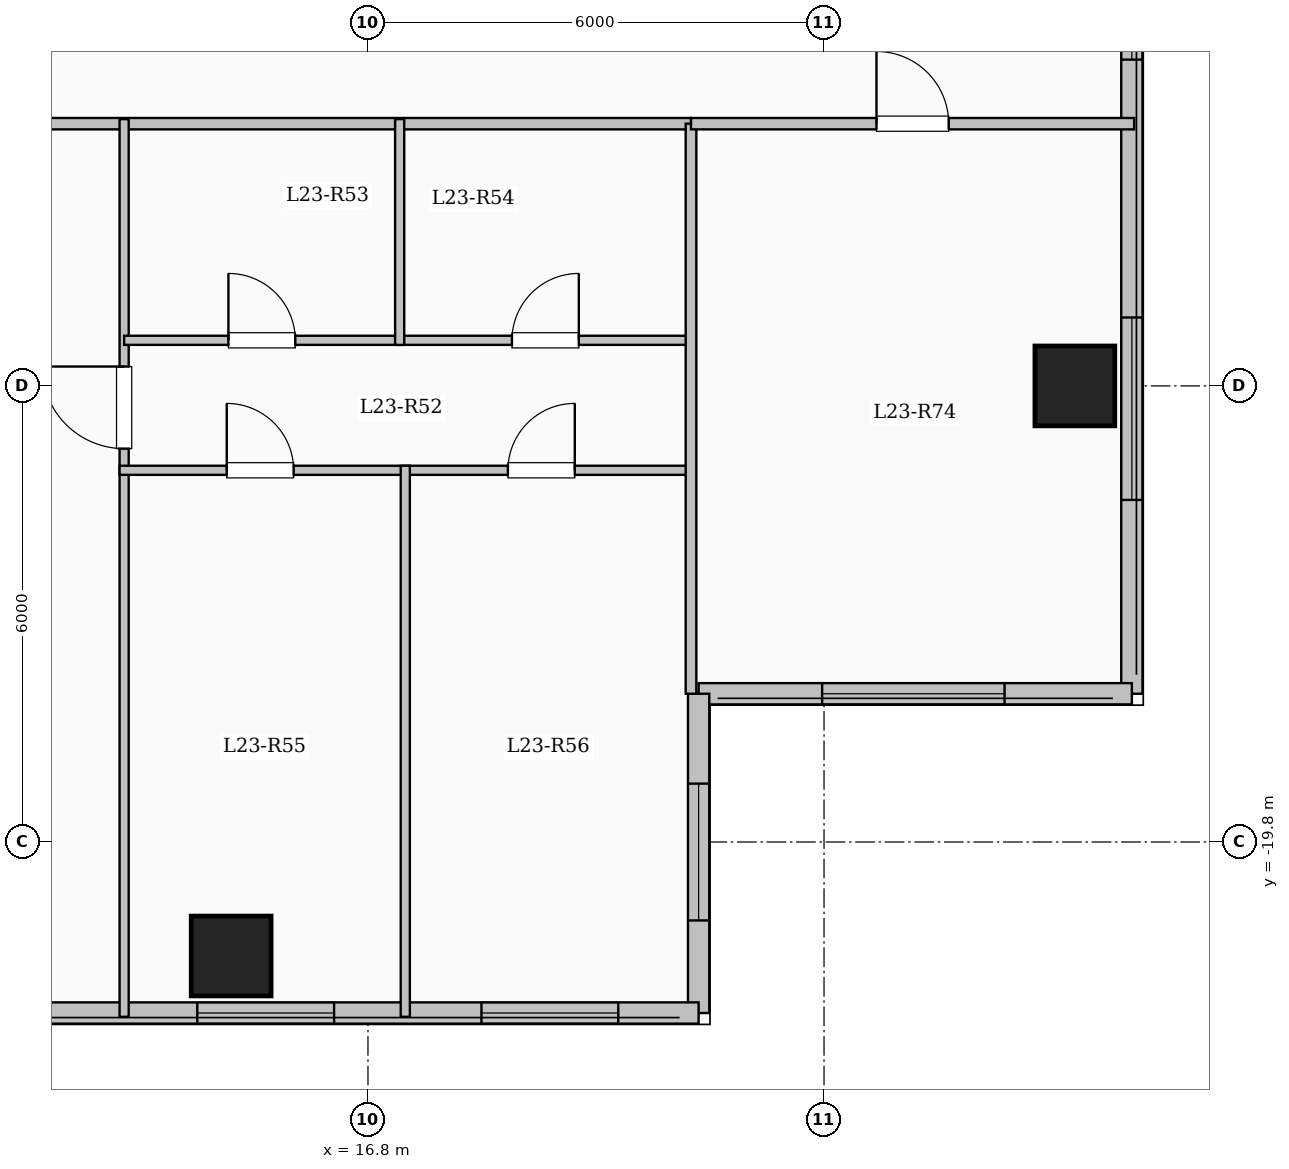
"""IFC4 building model, lengths in metres.
Left out: names, types, materials, properties, quantities, classifications, styles, units other than length and angle.
Written with IfcOpenShell. Run it as: python <this file> out.ifc"""

import sys

from ifc_helpers import new_model, si_unit, direction, frame, frame_2d, origin, origin_2d, place, context, subcontext, project, spatial, rectangle, extrude, element, fill, save


model = new_model("IFC4")
c1 = context("Model", 3, precision=1e-05, world=origin(), true_north=direction((0.0, 1.0)))
c2 = subcontext(c1, "Body", "Model", "MODEL_VIEW")
j1 = project(units=[si_unit("LENGTHUNIT", "METRE"), si_unit("PLANEANGLEUNIT", "RADIAN")], contexts=[c1])
p1 = place(None, origin())
s1 = spatial("IfcSite", under=j1, at=p1, CompositionType="ELEMENT")
p2 = place(p1, origin())
s2 = spatial("IfcBuilding", under=s1, at=p2, CompositionType="ELEMENT")
p3 = place(p2, frame((0.0, 0.0, 88.35)))
s3 = spatial("IfcBuildingStorey", under=s2, at=p3, CompositionType="ELEMENT", Elevation=88.35)
for number, where, z_axis, x_axis in (
    (1, (15.0, -21.3, 0.0), (0.0, 0.0, 1.0), (1.0, 0.0, 0.0)),
    (2, (26.1, -13.8, 0.0), (0.0, 0.0, 1.0), (1.0, 0.0, 0.0)),
):
    element("IfcColumn", number, at=place(p3, frame(where, z_axis=z_axis, x_axis=x_axis)), inside=s3, PredefinedType="COLUMN", context=c2, shape_type="SweptSolid", body=[
        extrude(rectangle(XDim=1.05, YDim=1.05, at=origin_2d()), origin(), (0.0, 0.0, 1.0), 3.35),
    ])
p4 = place(p3, frame((26.85, 17.85, 0.0), z_axis=(0.0, 0.0, 1.0), x_axis=(0.0, -1.0, 0.0)))
e3 = element("IfcWall", 3, at=p4, inside=s3, PredefinedType="SOLIDWALL", context=c2, shape_type="SweptSolid", body=[
    extrude(rectangle(XDim=35.7, YDim=0.28, at=frame_2d((17.85, 0.0))), origin(), (0.0, 0.0, 1.0), 3.1),
])
p5 = place(p4, frame((1.675, 0.0, 0.9)))
e4 = element("IfcOpeningElement", 4, at=p5, cuts=e3, PredefinedType="OPENING", context=c2, shape_type="SweptSolid", body=[
    extrude(rectangle(XDim=2.0, YDim=1.7, at=frame_2d((1.0, 0.85))), frame((0.0, 0.15, 0.0), z_axis=(0.0, -1.0, 0.0), x_axis=(1.0, 0.0, 0.0)), (0.0, 0.0, 1.0), 0.3),
])
p6 = place(p4, frame((5.725, 0.0, 0.95)))
e5 = element("IfcOpeningElement", 5, at=p6, cuts=e3, PredefinedType="OPENING", context=c2, shape_type="SweptSolid", body=[
    extrude(rectangle(XDim=1.0, YDim=1.5, at=frame_2d((0.5, 0.75))), frame((0.0, 0.15, 0.0), z_axis=(0.0, -1.0, 0.0), x_axis=(1.0, 0.0, 0.0)), (0.0, 0.0, 1.0), 0.3),
])
p7 = place(p4, frame((15.1, 0.0, 0.9)))
e6 = element("IfcOpeningElement", 6, at=p7, cuts=e3, PredefinedType="OPENING", context=c2, shape_type="SweptSolid", body=[
    extrude(rectangle(XDim=2.0, YDim=1.7, at=frame_2d((1.0, 0.85))), frame((0.0, 0.15, 0.0), z_axis=(0.0, -1.0, 0.0), x_axis=(1.0, 0.0, 0.0)), (0.0, 0.0, 1.0), 0.3),
])
p8 = place(p4, frame((25.857, 0.0, 0.9)))
e7 = element("IfcOpeningElement", 7, at=p8, cuts=e3, PredefinedType="OPENING", context=c2, shape_type="SweptSolid", body=[
    extrude(rectangle(XDim=1.5, YDim=1.65, at=frame_2d((0.75, 0.825))), frame((0.0, 0.15, 0.0), z_axis=(0.0, -1.0, 0.0), x_axis=(1.0, 0.0, 0.0)), (0.0, 0.0, 1.0), 0.3),
])
p9 = place(p4, frame((30.75, 0.0, 0.9)))
e8 = element("IfcOpeningElement", 8, at=p9, cuts=e3, PredefinedType="OPENING", context=c2, shape_type="SweptSolid", body=[
    extrude(rectangle(XDim=2.4, YDim=1.8, at=frame_2d((1.2, 0.9))), frame((0.0, 0.15, 0.0), z_axis=(0.0, -1.0, 0.0), x_axis=(1.0, 0.0, 0.0)), (0.0, 0.0, 1.0), 0.3),
])
p10 = place(p3, frame((26.85, -17.85, 0.0), z_axis=(0.0, 0.0, 1.0), x_axis=(-1.0, 0.0, 0.0)))
e9 = element("IfcWall", 9, at=p10, inside=s3, PredefinedType="SOLIDWALL", context=c2, shape_type="SweptSolid", body=[
    extrude(rectangle(XDim=5.7, YDim=0.28, at=frame_2d((2.85, 0.0))), origin(), (0.0, 0.0, 1.0), 3.1),
])
p11 = place(p10, frame((1.675, 0.0, 0.9)))
e10 = element("IfcOpeningElement", 10, at=p11, cuts=e9, PredefinedType="OPENING", context=c2, shape_type="SweptSolid", body=[
    extrude(rectangle(XDim=2.4, YDim=1.8, at=frame_2d((1.2, 0.9))), frame((0.0, 0.15, 0.0), z_axis=(0.0, -1.0, 0.0), x_axis=(1.0, 0.0, 0.0)), (0.0, 0.0, 1.0), 0.3),
])
p12 = place(p3, frame((21.15, -17.85, 0.0), z_axis=(0.0, 0.0, 1.0), x_axis=(0.0, -1.0, 0.0)))
e11 = element("IfcWall", 11, at=p12, inside=s3, PredefinedType="SOLIDWALL", context=c2, shape_type="SweptSolid", body=[
    extrude(rectangle(XDim=4.2, YDim=0.28, at=frame_2d((2.1, 0.0))), origin(), (0.0, 0.0, 1.0), 3.1),
])
p13 = place(p12, frame((1.182, 0.0, 0.9)))
e12 = element("IfcOpeningElement", 12, at=p13, cuts=e11, PredefinedType="OPENING", context=c2, shape_type="SweptSolid", body=[
    extrude(rectangle(XDim=1.8, YDim=1.65, at=frame_2d((0.9, 0.825))), frame((0.0, 0.15, 0.0), z_axis=(0.0, -1.0, 0.0), x_axis=(1.0, 0.0, 0.0)), (0.0, 0.0, 1.0), 0.3),
])
p14 = place(p3, frame((21.15, -22.05, 0.0), z_axis=(0.0, 0.0, 1.0), x_axis=(-1.0, 0.0, 0.0)))
e13 = element("IfcWall", 13, at=p14, inside=s3, PredefinedType="SOLIDWALL", context=c2, shape_type="SweptSolid", body=[
    extrude(rectangle(XDim=13.8, YDim=0.28, at=frame_2d((6.9, 0.0))), origin(), (0.0, 0.0, 1.0), 3.1),
])
p15 = place(p14, frame((1.057, 0.0, 0.9)))
e14 = element("IfcOpeningElement", 14, at=p15, cuts=e13, PredefinedType="OPENING", context=c2, shape_type="SweptSolid", body=[
    extrude(rectangle(XDim=1.8, YDim=1.65, at=frame_2d((0.9, 0.825))), frame((0.0, 0.15, 0.0), z_axis=(0.0, -1.0, 0.0), x_axis=(1.0, 0.0, 0.0)), (0.0, 0.0, 1.0), 0.3),
])
p16 = place(p14, frame((4.796, 0.0, 0.9)))
e15 = element("IfcOpeningElement", 15, at=p16, cuts=e13, PredefinedType="OPENING", context=c2, shape_type="SweptSolid", body=[
    extrude(rectangle(XDim=1.8, YDim=1.65, at=frame_2d((0.9, 0.825))), frame((0.0, 0.15, 0.0), z_axis=(0.0, -1.0, 0.0), x_axis=(1.0, 0.0, 0.0)), (0.0, 0.0, 1.0), 0.3),
])
p17 = place(p14, frame((8.862, 0.0, 0.9)))
e16 = element("IfcOpeningElement", 16, at=p17, cuts=e13, PredefinedType="OPENING", context=c2, shape_type="SweptSolid", body=[
    extrude(rectangle(XDim=2.4, YDim=1.8, at=frame_2d((1.2, 0.9))), frame((0.0, 0.15, 0.0), z_axis=(0.0, -1.0, 0.0), x_axis=(1.0, 0.0, 0.0)), (0.0, 0.0, 1.0), 0.3),
])
p18 = place(p14, frame((12.803, 0.0, 0.95)))
e17 = element("IfcOpeningElement", 17, at=p18, cuts=e13, PredefinedType="OPENING", context=c2, shape_type="SweptSolid", body=[
    extrude(rectangle(XDim=0.85, YDim=1.5, at=frame_2d((0.425, 0.75))), frame((0.0, 0.15, 0.0), z_axis=(0.0, -1.0, 0.0), x_axis=(1.0, 0.0, 0.0)), (0.0, 0.0, 1.0), 0.3),
])
p19 = place(p3, frame((8.55, -10.35, 0.0), z_axis=(0.0, 0.0, 1.0), x_axis=(1.0, 0.0, 0.0)))
e18 = element("IfcWall", 18, at=p19, inside=s3, PredefinedType="PARTITIONING", context=c2, shape_type="SweptSolid", body=[
    extrude(rectangle(XDim=12.5, YDim=0.15, at=frame_2d((6.25, 0.0))), origin(), (0.0, 0.0, 1.0), 3.1),
])
p20 = place(p19, frame((0.75, 0.0, 0.0)))
e19 = element("IfcOpeningElement", 19, at=p20, cuts=e18, PredefinedType="OPENING", context=c2, shape_type="SweptSolid", body=[
    extrude(rectangle(XDim=0.96, YDim=2.15, at=frame_2d((0.48, 1.075))), frame((0.0, 0.085, 0.0), z_axis=(0.0, -1.0, 0.0), x_axis=(1.0, 0.0, 0.0)), (0.0, 0.0, 1.0), 0.17),
])
p21 = place(p3, frame((13.592, -22.1, 0.0), z_axis=(0.0, 0.0, 1.0), x_axis=(0.0, 1.0, 0.0)))
e20 = element("IfcWall", 20, at=p21, inside=s3, PredefinedType="PARTITIONING", context=c2, shape_type="SweptSolid", body=[
    extrude(rectangle(XDim=11.81, YDim=0.12, at=frame_2d((5.905, 0.0))), origin(), (0.0, 0.0, 1.0), 3.1),
])
p22 = place(p21, frame((7.475, 0.0, 0.0)))
e21 = element("IfcOpeningElement", 21, at=p22, cuts=e20, PredefinedType="OPENING", context=c2, shape_type="SweptSolid", body=[
    extrude(rectangle(XDim=1.08, YDim=2.15, at=frame_2d((0.54, 1.075))), frame((0.0, 0.07, 0.0), z_axis=(0.0, -1.0, 0.0), x_axis=(1.0, 0.0, 0.0)), (0.0, 0.0, 1.0), 0.14),
])
p23 = place(p3, frame((13.592, -13.2, 0.0), z_axis=(0.0, 0.0, 1.0), x_axis=(1.0, 0.0, 0.0)))
e22 = element("IfcWall", 22, at=p23, inside=s3, PredefinedType="PARTITIONING", context=c2, shape_type="SweptSolid", body=[
    extrude(rectangle(XDim=3.625, YDim=0.12, at=frame_2d((1.812, 0.0))), origin(), (0.0, 0.0, 1.0), 3.1),
])
p24 = place(p23, frame((1.372, 0.0, 0.0)))
e23 = element("IfcOpeningElement", 23, at=p24, cuts=e22, PredefinedType="OPENING", context=c2, shape_type="SweptSolid", body=[
    extrude(rectangle(XDim=0.88, YDim=2.1, at=frame_2d((0.44, 1.05))), frame((0.0, 0.07, 0.0), z_axis=(0.0, -1.0, 0.0), x_axis=(1.0, 0.0, 0.0)), (0.0, 0.0, 1.0), 0.14),
])
p25 = place(p3, frame((17.217, -13.2, 0.0), z_axis=(0.0, 0.0, 1.0), x_axis=(1.0, 0.0, 0.0)))
e24 = element("IfcWall", 24, at=p25, inside=s3, PredefinedType="PARTITIONING", context=c2, shape_type="SweptSolid", body=[
    extrude(rectangle(XDim=3.833, YDim=0.12, at=frame_2d((1.917, 0.0))), origin(), (0.0, 0.0, 1.0), 3.1),
])
p26 = place(p25, frame((1.477, 0.0, 0.0)))
e25 = element("IfcOpeningElement", 25, at=p26, cuts=e24, PredefinedType="OPENING", context=c2, shape_type="SweptSolid", body=[
    extrude(rectangle(XDim=0.88, YDim=2.1, at=frame_2d((0.44, 1.05))), frame((0.0, 0.07, 0.0), z_axis=(0.0, -1.0, 0.0), x_axis=(1.0, 0.0, 0.0)), (0.0, 0.0, 1.0), 0.14),
])
p27 = place(p3, frame((13.532, -14.91, 0.0), z_axis=(0.0, 0.0, 1.0), x_axis=(1.0, 0.0, 0.0)))
e26 = element("IfcWall", 26, at=p27, inside=s3, PredefinedType="PARTITIONING", context=c2, shape_type="SweptSolid", body=[
    extrude(rectangle(XDim=7.578, YDim=0.12, at=frame_2d((3.789, 0.0))), origin(), (0.0, 0.0, 1.0), 3.1),
])
p28 = place(p27, frame((1.41, 0.0, 0.0)))
e27 = element("IfcOpeningElement", 27, at=p28, cuts=e26, PredefinedType="OPENING", context=c2, shape_type="SweptSolid", body=[
    extrude(rectangle(XDim=0.88, YDim=2.1, at=frame_2d((0.44, 1.05))), frame((0.0, 0.07, 0.0), z_axis=(0.0, -1.0, 0.0), x_axis=(1.0, 0.0, 0.0)), (0.0, 0.0, 1.0), 0.14),
])
p29 = place(p27, frame((5.109, 0.0, 0.0)))
e28 = element("IfcOpeningElement", 28, at=p29, cuts=e26, PredefinedType="OPENING", context=c2, shape_type="SweptSolid", body=[
    extrude(rectangle(XDim=0.88, YDim=2.1, at=frame_2d((0.44, 1.05))), frame((0.0, 0.07, 0.0), z_axis=(0.0, -1.0, 0.0), x_axis=(1.0, 0.0, 0.0)), (0.0, 0.0, 1.0), 0.14),
])
p30 = place(p3, frame((17.217, -13.26, 0.0), z_axis=(0.0, 0.0, 1.0), x_axis=(0.0, 1.0, 0.0)))
e29 = element("IfcWall", 29, at=p30, inside=s3, PredefinedType="PARTITIONING", context=c2, shape_type="SweptSolid", body=[
    extrude(rectangle(XDim=2.97, YDim=0.12, at=frame_2d((1.485, 0.0))), origin(), (0.0, 0.0, 1.0), 3.1),
])
p31 = place(p3, frame((17.291, -22.1, 0.0), z_axis=(0.0, 0.0, 1.0), x_axis=(0.0, 1.0, 0.0)))
e30 = element("IfcWall", 30, at=p31, inside=s3, PredefinedType="PARTITIONING", context=c2, shape_type="SweptSolid", body=[
    extrude(rectangle(XDim=7.25, YDim=0.12, at=frame_2d((3.625, 0.0))), origin(), (0.0, 0.0, 1.0), 3.1),
])
p32 = place(p3, frame((21.05, -17.85, 0.0), z_axis=(0.0, 0.0, 1.0), x_axis=(0.0, 1.0, 0.0)))
e31 = element("IfcWall", 31, at=p32, inside=s3, PredefinedType="PARTITIONING", context=c2, shape_type="SweptSolid", body=[
    extrude(rectangle(XDim=7.5, YDim=0.14, at=frame_2d((3.75, 0.0))), origin(), (0.0, 0.0, 1.0), 3.1),
])
p33 = place(p3, frame((21.05, -10.35, 0.0), z_axis=(0.0, 0.0, 1.0), x_axis=(1.0, 0.0, 0.0)))
e32 = element("IfcWall", 32, at=p33, inside=s3, PredefinedType="PARTITIONING", context=c2, shape_type="SweptSolid", body=[
    extrude(rectangle(XDim=5.83, YDim=0.15, at=frame_2d((2.915, 0.0))), origin(), (0.0, 0.0, 1.0), 3.1),
])
p34 = place(p33, frame((2.44, 0.0, 0.0)))
e33 = element("IfcOpeningElement", 33, at=p34, cuts=e32, PredefinedType="OPENING", context=c2, shape_type="SweptSolid", body=[
    extrude(rectangle(XDim=0.95, YDim=2.15, at=frame_2d((0.475, 1.075))), frame((0.0, 0.085, 0.0), z_axis=(0.0, -1.0, 0.0), x_axis=(1.0, 0.0, 0.0)), (0.0, 0.0, 1.0), 0.17),
])
p35 = place(p8, origin())
e34 = element("IfcWindow", 34, at=p35, inside=s3, PartitioningType="SINGLE_PANEL", PredefinedType="WINDOW", context=c2, shape_type="SweptSolid", body=[
    extrude(rectangle(XDim=1.5, YDim=1.65, at=frame_2d((0.75, 0.825))), frame((0.0, 0.03, 0.0), z_axis=(0.0, -1.0, 0.0), x_axis=(1.0, 0.0, 0.0)), (0.0, 0.0, 1.0), 0.06),
])
fill(e7, e34)
p36 = place(p9, origin())
e35 = element("IfcWindow", 35, at=p36, inside=s3, PartitioningType="SINGLE_PANEL", PredefinedType="WINDOW", context=c2, shape_type="SweptSolid", body=[
    extrude(rectangle(XDim=2.4, YDim=1.8, at=frame_2d((1.2, 0.9))), frame((0.0, 0.03, 0.0), z_axis=(0.0, -1.0, 0.0), x_axis=(1.0, 0.0, 0.0)), (0.0, 0.0, 1.0), 0.06),
])
fill(e8, e35)
p37 = place(p11, origin())
e36 = element("IfcWindow", 36, at=p37, inside=s3, PartitioningType="SINGLE_PANEL", PredefinedType="WINDOW", context=c2, shape_type="SweptSolid", body=[
    extrude(rectangle(XDim=2.4, YDim=1.8, at=frame_2d((1.2, 0.9))), frame((0.0, 0.03, 0.0), z_axis=(0.0, -1.0, 0.0), x_axis=(1.0, 0.0, 0.0)), (0.0, 0.0, 1.0), 0.06),
])
fill(e10, e36)
p38 = place(p13, origin())
e37 = element("IfcWindow", 37, at=p38, inside=s3, PartitioningType="SINGLE_PANEL", PredefinedType="WINDOW", context=c2, shape_type="SweptSolid", body=[
    extrude(rectangle(XDim=1.8, YDim=1.65, at=frame_2d((0.9, 0.825))), frame((0.0, 0.03, 0.0), z_axis=(0.0, -1.0, 0.0), x_axis=(1.0, 0.0, 0.0)), (0.0, 0.0, 1.0), 0.06),
])
fill(e12, e37)
p39 = place(p15, origin())
e38 = element("IfcWindow", 38, at=p39, inside=s3, PartitioningType="SINGLE_PANEL", PredefinedType="WINDOW", context=c2, shape_type="SweptSolid", body=[
    extrude(rectangle(XDim=1.8, YDim=1.65, at=frame_2d((0.9, 0.825))), frame((0.0, 0.03, 0.0), z_axis=(0.0, -1.0, 0.0), x_axis=(1.0, 0.0, 0.0)), (0.0, 0.0, 1.0), 0.06),
])
fill(e14, e38)
p40 = place(p16, origin())
e39 = element("IfcWindow", 39, at=p40, inside=s3, PartitioningType="SINGLE_PANEL", PredefinedType="WINDOW", context=c2, shape_type="SweptSolid", body=[
    extrude(rectangle(XDim=1.8, YDim=1.65, at=frame_2d((0.9, 0.825))), frame((0.0, 0.03, 0.0), z_axis=(0.0, -1.0, 0.0), x_axis=(1.0, 0.0, 0.0)), (0.0, 0.0, 1.0), 0.06),
])
fill(e15, e39)
p41 = place(p22, origin())
e40 = element("IfcDoor", 40, at=p41, inside=s3, OperationType="SINGLE_SWING_RIGHT", PredefinedType="DOOR", context=c2, shape_type="SweptSolid", body=[
    extrude(rectangle(XDim=1.08, YDim=2.15, at=frame_2d((0.54, 1.075))), frame((0.0, 0.025, 0.0), z_axis=(0.0, -1.0, 0.0), x_axis=(1.0, 0.0, 0.0)), (0.0, 0.0, 1.0), 0.05),
])
fill(e21, e40)
p42 = place(p24, origin())
e41 = element("IfcDoor", 41, at=p42, inside=s3, OperationType="SINGLE_SWING_LEFT", PredefinedType="DOOR", context=c2, shape_type="SweptSolid", body=[
    extrude(rectangle(XDim=0.88, YDim=2.1, at=frame_2d((0.44, 1.05))), frame((0.0, 0.025, 0.0), z_axis=(0.0, -1.0, 0.0), x_axis=(1.0, 0.0, 0.0)), (0.0, 0.0, 1.0), 0.05),
])
fill(e23, e41)
p43 = place(p26, origin())
e42 = element("IfcDoor", 42, at=p43, inside=s3, OperationType="SINGLE_SWING_RIGHT", PredefinedType="DOOR", context=c2, shape_type="SweptSolid", body=[
    extrude(rectangle(XDim=0.88, YDim=2.1, at=frame_2d((0.44, 1.05))), frame((0.0, 0.025, 0.0), z_axis=(0.0, -1.0, 0.0), x_axis=(1.0, 0.0, 0.0)), (0.0, 0.0, 1.0), 0.05),
])
fill(e25, e42)
p44 = place(p28, origin())
e43 = element("IfcDoor", 43, at=p44, inside=s3, OperationType="SINGLE_SWING_LEFT", PredefinedType="DOOR", context=c2, shape_type="SweptSolid", body=[
    extrude(rectangle(XDim=0.88, YDim=2.1, at=frame_2d((0.44, 1.05))), frame((0.0, 0.025, 0.0), z_axis=(0.0, -1.0, 0.0), x_axis=(1.0, 0.0, 0.0)), (0.0, 0.0, 1.0), 0.05),
])
fill(e27, e43)
p45 = place(p29, origin())
e44 = element("IfcDoor", 44, at=p45, inside=s3, OperationType="SINGLE_SWING_RIGHT", PredefinedType="DOOR", context=c2, shape_type="SweptSolid", body=[
    extrude(rectangle(XDim=0.88, YDim=2.1, at=frame_2d((0.44, 1.05))), frame((0.0, 0.025, 0.0), z_axis=(0.0, -1.0, 0.0), x_axis=(1.0, 0.0, 0.0)), (0.0, 0.0, 1.0), 0.05),
])
fill(e28, e44)
p46 = place(p34, origin())
e45 = element("IfcDoor", 45, at=p46, inside=s3, OperationType="SINGLE_SWING_LEFT", PredefinedType="DOOR", context=c2, shape_type="SweptSolid", body=[
    extrude(rectangle(XDim=0.95, YDim=2.15, at=frame_2d((0.475, 1.075))), frame((0.0, 0.025, 0.0), z_axis=(0.0, -1.0, 0.0), x_axis=(1.0, 0.0, 0.0)), (0.0, 0.0, 1.0), 0.05),
])
fill(e33, e45)
save(model, sys.argv[1])
